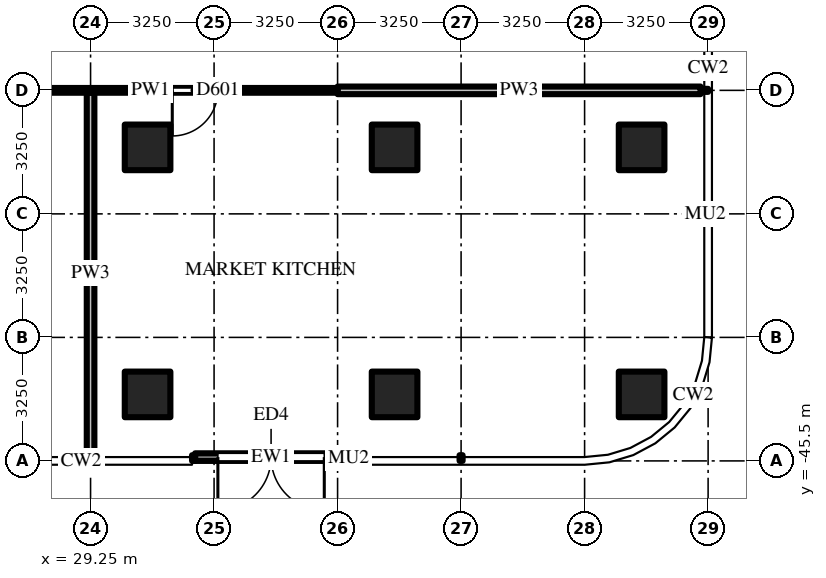
"""IFC4 building model, lengths in metres.
Left out: names, types, materials, properties, quantities, classifications, styles, units other than length and angle.
Written with IfcOpenShell. Run it as: python <this file> out.ifc"""

import sys

from ifc_helpers import new_model, si_unit, direction, frame, frame_2d, origin, origin_2d, place, context, subcontext, project, spatial, rectangle, extrude, source, transform, mapped, element, fill, save


model = new_model("IFC4")
c1 = context("Model", 3, precision=1e-05, world=origin(), true_north=direction((0.0, 1.0)))
c2 = subcontext(c1, "Body", "Model", "MODEL_VIEW")
j1 = project(units=[si_unit("LENGTHUNIT", "METRE"), si_unit("PLANEANGLEUNIT", "RADIAN")], contexts=[c1])
p1 = place(None, origin())
s1 = spatial("IfcSite", under=j1, at=p1, CompositionType="ELEMENT")
p2 = place(p1, origin())
s2 = spatial("IfcBuilding", under=s1, at=p2, CompositionType="ELEMENT")
p3 = place(p2, origin())
s3 = spatial("IfcBuildingStorey", under=s2, at=p3, CompositionType="ELEMENT", Elevation=0.0)
m1 = source(origin(), c2, "Body", "SweptSolid", [
    extrude(rectangle(XDim=1.2, YDim=1.2, at=origin_2d()), origin(), (0.0, 0.0, 1.0), 8.5),
])
for number, where, z_axis, x_axis in (
    (1, (30.75, -37.25, -0.5), (0.0, 0.0, 1.0), (1.0, 0.0, 0.0)),
    (2, (30.75, -43.75, -0.5), (0.0, 0.0, 1.0), (1.0, 0.0, 0.0)),
    (3, (37.25, -37.25, -0.5), (0.0, 0.0, 1.0), (1.0, 0.0, 0.0)),
    (4, (37.25, -43.75, -0.5), (0.0, 0.0, 1.0), (1.0, 0.0, 0.0)),
    (5, (43.75, -37.25, -0.5), (0.0, 0.0, 1.0), (1.0, 0.0, 0.0)),
    (6, (43.75, -43.75, -0.5), (0.0, 0.0, 1.0), (1.0, 0.0, 0.0)),
):
    element("IfcColumn", number, at=place(p3, frame(where, z_axis=z_axis, x_axis=x_axis)), inside=s3, PredefinedType="COLUMN", context=c2, shape_type="MappedRepresentation", body=[
        mapped(m1, transform((0.0, 0.0, 0.0))),
    ])
m2 = source(origin(), c2, "Body", "SweptSolid", [
    extrude(rectangle(XDim=4.0, YDim=0.2, at=frame_2d((2.0, 0.0))), origin(), (0.0, 0.0, 1.0), 7.7),
])
p4 = place(p3, frame((36.0, -45.4, 0.0), z_axis=(0.0, 0.0, 1.0), x_axis=(-1.0, 0.0, 0.0)))
e7 = element("IfcWall", 7, at=p4, inside=s3, PredefinedType="SOLIDWALL", context=c2, shape_type="MappedRepresentation", body=[
    mapped(m2, transform((0.0, 0.0, 0.0))),
])
m3 = source(origin(), c2, "Body", "SweptSolid", [
    extrude(rectangle(XDim=2.8, YDim=2.4, at=frame_2d((1.4, 1.2))), frame((0.0, 0.11, 0.0), z_axis=(0.0, -1.0, 0.0), x_axis=(1.0, 0.0, 0.0)), (0.0, 0.0, 1.0), 0.22),
])
p5 = place(p4, frame((0.6, 0.0, 0.0)))
e8 = element("IfcOpeningElement", 8, at=p5, cuts=e7, PredefinedType="OPENING", context=c2, shape_type="MappedRepresentation", body=[
    mapped(m3, transform((0.0, 0.0, 0.0))),
])
m4 = source(origin(), c2, "Body", "SweptSolid", [
    extrude(rectangle(XDim=9.488, YDim=0.2, at=frame_2d((4.744, 0.0))), origin(), (0.0, 0.0, 1.0), 6.839),
])
p6 = place(p3, frame((29.25, -45.3, 0.0), z_axis=(0.0, 0.0, 1.0), x_axis=(0.0, 1.0, 0.0)))
e9 = element("IfcWall", 9, at=p6, inside=s3, PredefinedType="PARTITIONING", context=c2, shape_type="MappedRepresentation", body=[
    mapped(m4, transform((0.0, 0.0, 0.0))),
])
m5 = source(origin(), c2, "Body", "SweptSolid", [
    extrude(rectangle(XDim=9.55, YDim=0.2, at=frame_2d((4.775, 0.0))), origin(), (0.0, 0.0, 1.0), 6.997),
])
p7 = place(p3, frame((35.75, -35.75, 0.0), z_axis=(0.0, 0.0, 1.0), x_axis=(1.0, 0.0, 0.0)))
e10 = element("IfcWall", 10, at=p7, inside=s3, PredefinedType="PARTITIONING", context=c2, shape_type="MappedRepresentation", body=[
    mapped(m5, transform((0.0, 0.0, 0.0))),
])
m6 = source(origin(), c2, "Body", "SweptSolid", [
    extrude(rectangle(XDim=9.85, YDim=0.125, at=frame_2d((4.925, 0.0))), origin(), (0.0, 0.0, 1.0), 6.997),
])
p8 = place(p3, frame((35.75, -35.75, 0.0), z_axis=(0.0, 0.0, 1.0), x_axis=(-1.0, 0.0, 0.0)))
e11 = element("IfcWall", 11, at=p8, inside=s3, PredefinedType="PARTITIONING", context=c2, shape_type="MappedRepresentation", body=[
    mapped(m6, transform((0.0, 0.0, 0.0))),
])
m7 = source(origin(), c2, "Body", "SweptSolid", [
    extrude(rectangle(XDim=1.2, YDim=2.1, at=frame_2d((0.6, 1.05))), frame((0.0, 0.073, 0.0), z_axis=(0.0, -1.0, 0.0), x_axis=(1.0, 0.0, 0.0)), (0.0, 0.0, 1.0), 0.145),
])
p9 = place(p8, frame((3.15, 0.0, 0.0)))
e12 = element("IfcOpeningElement", 12, at=p9, cuts=e11, PredefinedType="OPENING", context=c2, shape_type="MappedRepresentation", body=[
    mapped(m7, transform((0.0, 0.0, 0.0))),
])
m8 = source(origin(), c2, "Body", "SweptSolid", [
    extrude(rectangle(XDim=2.8, YDim=2.4, at=frame_2d((1.4, 1.2))), frame((0.0, 0.025, 0.0), z_axis=(0.0, -1.0, 0.0), x_axis=(1.0, 0.0, 0.0)), (0.0, 0.0, 1.0), 0.05),
])
p10 = place(p5, origin())
e13 = element("IfcDoor", 13, at=p10, inside=s3, OperationType="DOUBLE_DOOR_SINGLE_SWING", PredefinedType="DOOR", context=c2, shape_type="MappedRepresentation", body=[
    mapped(m8, transform((0.0, 0.0, 0.0))),
])
fill(e8, e13)
m9 = source(origin(), c2, "Body", "SweptSolid", [
    extrude(rectangle(XDim=1.2, YDim=2.1, at=frame_2d((0.6, 1.05))), frame((0.0, 0.025, 0.0), z_axis=(0.0, -1.0, 0.0), x_axis=(1.0, 0.0, 0.0)), (0.0, 0.0, 1.0), 0.05),
])
p11 = place(p9, origin())
e14 = element("IfcDoor", 14, at=p11, inside=s3, OperationType="SINGLE_SWING_RIGHT", PredefinedType="DOOR", context=c2, shape_type="MappedRepresentation", body=[
    mapped(m9, transform((0.0, 0.0, 0.0))),
])
fill(e12, e14)
save(model, sys.argv[1])
